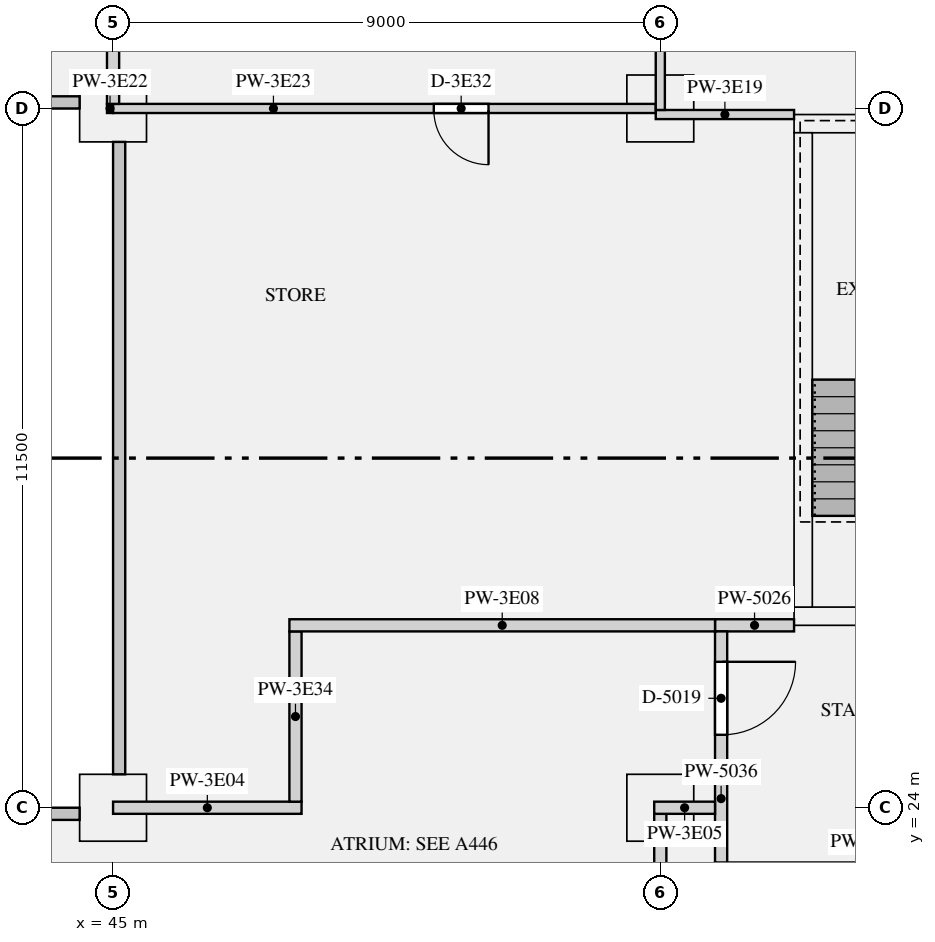
"""IFC4 building model, lengths in metres.
Left out: names, types, materials, properties, quantities, classifications, styles, units other than length and angle.
Written with IfcOpenShell. Run it as: python <this file> out.ifc"""

import sys

from ifc_helpers import new_model, si_unit, direction, frame, frame_2d, origin, origin_2d, place, context, subcontext, project, spatial, rectangle, extrude, element, fill, save


model = new_model("IFC4")
c1 = context("Model", 3, precision=1e-05, world=origin(), true_north=direction((0.0, 1.0)))
c2 = subcontext(c1, "Body", "Model", "MODEL_VIEW")
j1 = project(units=[si_unit("LENGTHUNIT", "METRE"), si_unit("PLANEANGLEUNIT", "RADIAN")], contexts=[c1])
p1 = place(None, origin())
s1 = spatial("IfcSite", under=j1, at=p1, CompositionType="ELEMENT")
p2 = place(p1, origin())
s2 = spatial("IfcBuilding", under=s1, at=p2, CompositionType="ELEMENT")
p3 = place(p2, frame((0.0, 0.0, 172.8)))
s3 = spatial("IfcBuildingStorey", under=s2, at=p3, CompositionType="ELEMENT", Elevation=172.8)
for number, where, z_axis, x_axis in (
    (1, (45.0, 24.0, 0.0), (0.0, 0.0, 1.0), (1.0, 0.0, 0.0)),
    (2, (54.0, 24.0, 0.0), (0.0, 0.0, 1.0), (1.0, 0.0, 0.0)),
    (3, (45.0, 35.5, 0.0), (0.0, 0.0, 1.0), (1.0, 0.0, 0.0)),
    (4, (54.0, 35.5, 0.0), (0.0, 0.0, 1.0), (1.0, 0.0, 0.0)),
):
    element("IfcColumn", number, at=place(p3, frame(where, z_axis=z_axis, x_axis=x_axis)), inside=s3, PredefinedType="COLUMN", context=c2, shape_type="SweptSolid", body=[
        extrude(rectangle(XDim=1.1, YDim=1.1, at=origin_2d()), origin(), (0.0, 0.0, 1.0), 3.15),
    ])
p4 = place(p3, frame((56.2, 27.15, 0.0), z_axis=(0.0, 0.0, 1.0), x_axis=(1.0, 0.0, 0.0)))
e5 = element("IfcWall", 5, at=p4, inside=s3, PredefinedType="SHEAR", context=c2, shape_type="SweptSolid", body=[
    extrude(rectangle(XDim=3.6, YDim=0.3, at=frame_2d((1.8, 0.0))), origin(), (0.0, 0.0, 1.0), 3.15),
])
p5 = place(p4, frame((1.25, 0.0, 0.0)))
e6 = element("IfcOpeningElement", 6, at=p5, cuts=e5, PredefinedType="OPENING", context=c2, shape_type="SweptSolid", body=[
    extrude(rectangle(XDim=1.1, YDim=2.1, at=frame_2d((0.55, 1.05))), frame((0.0, 0.16, 0.0), z_axis=(0.0, -1.0, 0.0), x_axis=(1.0, 0.0, 0.0)), (0.0, 0.0, 1.0), 0.32),
])
p6 = place(p3, frame((56.2, 35.25, 0.0), z_axis=(0.0, 0.0, 1.0), x_axis=(1.0, 0.0, 0.0)))
e7 = element("IfcWall", 7, at=p6, inside=s3, PredefinedType="SHEAR", context=c2, shape_type="SweptSolid", body=[
    extrude(rectangle(XDim=3.6, YDim=0.3, at=frame_2d((1.8, 0.0))), origin(), (0.0, 0.0, 1.0), 3.15),
])
p7 = place(p3, frame((56.35, 27.3, 0.0), z_axis=(0.0, 0.0, 1.0), x_axis=(0.0, 1.0, 0.0)))
e8 = element("IfcWall", 8, at=p7, inside=s3, PredefinedType="SHEAR", context=c2, shape_type="SweptSolid", body=[
    extrude(rectangle(XDim=7.8, YDim=0.3, at=frame_2d((3.9, 0.0))), origin(), (0.0, 0.0, 1.0), 3.15),
])
p8 = place(p3, frame((54.9, 27.0, 0.0), z_axis=(0.0, 0.0, 1.0), x_axis=(1.0, 0.0, 0.0)))
e9 = element("IfcWall", 9, at=p8, inside=s3, PredefinedType="PARTITIONING", context=c2, shape_type="SweptSolid", body=[
    extrude(rectangle(XDim=1.3, YDim=0.2, at=frame_2d((0.65, 0.0))), origin(), (0.0, 0.0, 1.0), 2.83),
])
p9 = place(p3, frame((55.0, 23.1, 0.0), z_axis=(0.0, 0.0, 1.0), x_axis=(0.0, 1.0, 0.0)))
e10 = element("IfcWall", 10, at=p9, inside=s3, PredefinedType="PARTITIONING", context=c2, shape_type="SweptSolid", body=[
    extrude(rectangle(XDim=3.8, YDim=0.2, at=frame_2d((1.9, 0.0))), origin(), (0.0, 0.0, 1.0), 2.83),
])
p10 = place(p9, frame((2.1, 0.0, 0.0)))
e11 = element("IfcOpeningElement", 11, at=p10, cuts=e10, PredefinedType="OPENING", context=c2, shape_type="SweptSolid", body=[
    extrude(rectangle(XDim=1.2, YDim=2.1, at=frame_2d((0.6, 1.05))), frame((0.0, 0.11, 0.0), z_axis=(0.0, -1.0, 0.0), x_axis=(1.0, 0.0, 0.0)), (0.0, 0.0, 1.0), 0.22),
])
p11 = place(p3, frame((45.0, 24.0, 0.0), z_axis=(0.0, 0.0, 1.0), x_axis=(1.0, 0.0, 0.0)))
e12 = element("IfcWall", 12, at=p11, inside=s3, PredefinedType="PARTITIONING", context=c2, shape_type="SweptSolid", body=[
    extrude(rectangle(XDim=3.1, YDim=0.2, at=frame_2d((1.55, 0.0))), origin(), (0.0, 0.0, 1.0), 2.83),
])
p12 = place(p3, frame((53.9, 24.0, 0.0), z_axis=(0.0, 0.0, 1.0), x_axis=(1.0, 0.0, 0.0)))
e13 = element("IfcWall", 13, at=p12, inside=s3, PredefinedType="PARTITIONING", context=c2, shape_type="SweptSolid", body=[
    extrude(rectangle(XDim=1.0, YDim=0.2, at=frame_2d((0.5, 0.0))), origin(), (0.0, 0.0, 1.0), 2.83),
])
p13 = place(p3, frame((47.9, 27.0, 0.0), z_axis=(0.0, 0.0, 1.0), x_axis=(1.0, 0.0, 0.0)))
e14 = element("IfcWall", 14, at=p13, inside=s3, PredefinedType="PARTITIONING", context=c2, shape_type="SweptSolid", body=[
    extrude(rectangle(XDim=7.0, YDim=0.2, at=frame_2d((3.5, 0.0))), origin(), (0.0, 0.0, 1.0), 2.83),
])
p14 = place(p3, frame((53.925, 35.4, 0.0), z_axis=(0.0, 0.0, 1.0), x_axis=(1.0, 0.0, 0.0)))
e15 = element("IfcWall", 15, at=p14, inside=s3, PredefinedType="PARTITIONING", context=c2, shape_type="SweptSolid", body=[
    extrude(rectangle(XDim=2.275, YDim=0.15, at=frame_2d((1.137, 0.0))), origin(), (0.0, 0.0, 1.0), 2.83),
])
p15 = place(p3, frame((44.9, 35.5, 0.0), z_axis=(0.0, 0.0, 1.0), x_axis=(1.0, 0.0, 0.0)))
e16 = element("IfcWall", 16, at=p15, inside=s3, PredefinedType="PARTITIONING", context=c2, shape_type="SweptSolid", body=[
    extrude(rectangle(XDim=0.1, YDim=0.15, at=frame_2d((0.05, 0.0))), origin(), (0.0, 0.0, 1.0), 2.83),
])
p16 = place(p3, frame((45.0, 35.5, 0.0), z_axis=(0.0, 0.0, 1.0), x_axis=(1.0, 0.0, 0.0)))
e17 = element("IfcWall", 17, at=p16, inside=s3, PredefinedType="PARTITIONING", context=c2, shape_type="SweptSolid", body=[
    extrude(rectangle(XDim=8.925, YDim=0.15, at=frame_2d((4.462, 0.0))), origin(), (0.0, 0.0, 1.0), 2.83),
])
p17 = place(p16, frame((5.275, 0.0, 0.0)))
e18 = element("IfcOpeningElement", 18, at=p17, cuts=e17, PredefinedType="OPENING", context=c2, shape_type="SweptSolid", body=[
    extrude(rectangle(XDim=0.9, YDim=2.1, at=frame_2d((0.45, 1.05))), frame((0.0, 0.085, 0.0), z_axis=(0.0, -1.0, 0.0), x_axis=(1.0, 0.0, 0.0)), (0.0, 0.0, 1.0), 0.17),
])
p18 = place(p3, frame((54.0, 35.475, 0.0), z_axis=(0.0, 0.0, 1.0), x_axis=(0.0, 1.0, 0.0)))
e19 = element("IfcWall", 19, at=p18, inside=s3, PredefinedType="PARTITIONING", context=c2, shape_type="SweptSolid", body=[
    extrude(rectangle(XDim=7.325, YDim=0.15, at=frame_2d((3.663, 0.0))), origin(), (0.0, 0.0, 1.0), 2.83),
])
p19 = place(p18, frame((3.275, 0.0, 0.0)))
e20 = element("IfcOpeningElement", 20, at=p19, cuts=e19, PredefinedType="OPENING", context=c2, shape_type="SweptSolid", body=[
    extrude(rectangle(XDim=1.5, YDim=2.1, at=frame_2d((0.75, 1.05))), frame((0.0, 0.085, 0.0), z_axis=(0.0, -1.0, 0.0), x_axis=(1.0, 0.0, 0.0)), (0.0, 0.0, 1.0), 0.17),
])
p20 = place(p3, frame((54.0, 16.1, 0.0), z_axis=(0.0, 0.0, 1.0), x_axis=(0.0, 1.0, 0.0)))
e21 = element("IfcWall", 21, at=p20, inside=s3, PredefinedType="PARTITIONING", context=c2, shape_type="SweptSolid", body=[
    extrude(rectangle(XDim=7.8, YDim=0.2, at=frame_2d((3.9, 0.0))), origin(), (0.0, 0.0, 1.0), 2.83),
])
p21 = place(p20, frame((1.85, 0.0, 0.0)))
e22 = element("IfcOpeningElement", 22, at=p21, cuts=e21, PredefinedType="OPENING", context=c2, shape_type="SweptSolid", body=[
    extrude(rectangle(XDim=1.1, YDim=2.1, at=frame_2d((0.55, 1.05))), frame((0.0, 0.11, 0.0), z_axis=(0.0, -1.0, 0.0), x_axis=(1.0, 0.0, 0.0)), (0.0, 0.0, 1.0), 0.22),
])
p22 = place(p3, frame((48.0, 24.1, 0.0), z_axis=(0.0, 0.0, 1.0), x_axis=(0.0, 1.0, 0.0)))
e23 = element("IfcWall", 23, at=p22, inside=s3, PredefinedType="PARTITIONING", context=c2, shape_type="SweptSolid", body=[
    extrude(rectangle(XDim=2.8, YDim=0.2, at=frame_2d((1.4, 0.0))), origin(), (0.0, 0.0, 1.0), 2.83),
])
p23 = place(p3, frame((45.0, 35.575, 0.0), z_axis=(0.0, 0.0, 1.0), x_axis=(0.0, 1.0, 0.0)))
e24 = element("IfcWall", 24, at=p23, inside=s3, PredefinedType="PARTITIONING", context=c2, shape_type="SweptSolid", body=[
    extrude(rectangle(XDim=7.225, YDim=0.2, at=frame_2d((3.613, 0.0))), origin(), (0.0, 0.0, 1.0), 2.83),
])
p24 = place(p10, frame((1.2, 0.0, 0.0), z_axis=(0.0, 0.0, 1.0), x_axis=(-1.0, 0.0, 0.0)))
e25 = element("IfcDoor", 25, at=p24, inside=s3, OperationType="SINGLE_SWING_LEFT", PredefinedType="DOOR", context=c2, shape_type="SweptSolid", body=[
    extrude(rectangle(XDim=1.2, YDim=2.1, at=frame_2d((0.6, 1.05))), frame((0.0, 0.025, 0.0), z_axis=(0.0, -1.0, 0.0), x_axis=(1.0, 0.0, 0.0)), (0.0, 0.0, 1.0), 0.05),
])
fill(e11, e25)
p25 = place(p17, frame((0.9, 0.0, 0.0), z_axis=(0.0, 0.0, 1.0), x_axis=(-1.0, 0.0, 0.0)))
e26 = element("IfcDoor", 26, at=p25, inside=s3, OperationType="SINGLE_SWING_LEFT", PredefinedType="DOOR", context=c2, shape_type="SweptSolid", body=[
    extrude(rectangle(XDim=0.9, YDim=2.1, at=frame_2d((0.45, 1.05))), frame((0.0, 0.025, 0.0), z_axis=(0.0, -1.0, 0.0), x_axis=(1.0, 0.0, 0.0)), (0.0, 0.0, 1.0), 0.05),
])
fill(e18, e26)
save(model, sys.argv[1])
